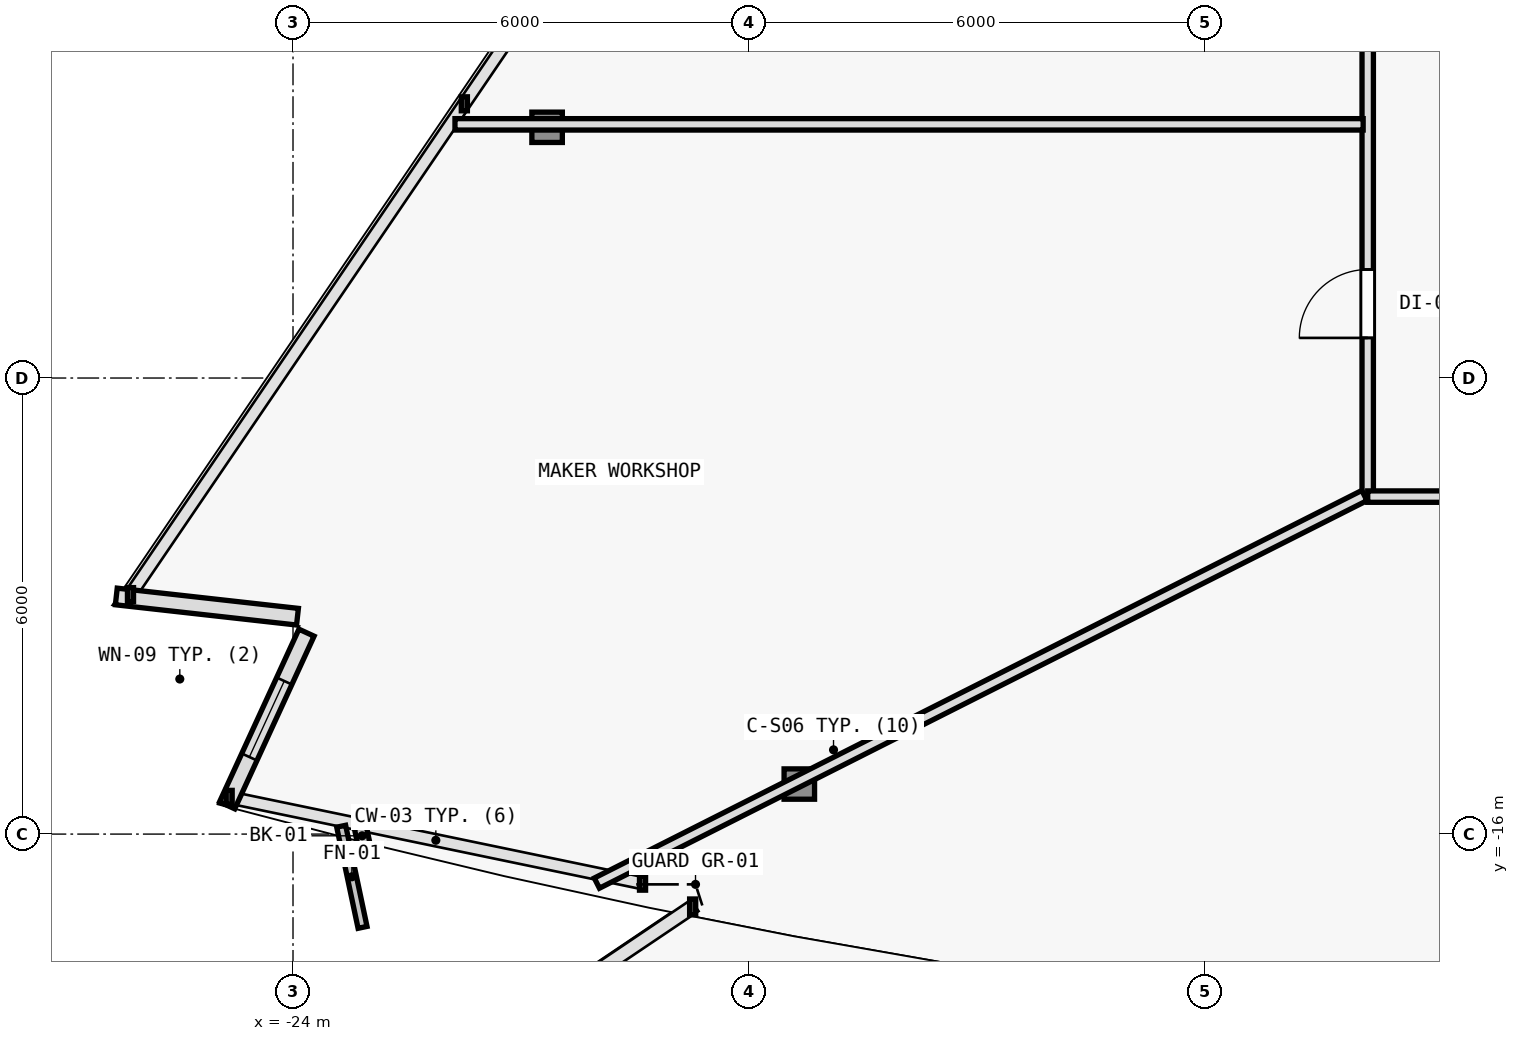
"""IFC4 building model, lengths in metres.
Left out: names, types, materials, properties, quantities, classifications, styles, units other than length and angle.
Written with IfcOpenShell. Run it as: python <this file> out.ifc"""

import sys

from ifc_helpers import new_model, si_unit, direction, frame, frame_2d, origin, origin_2d, place, context, subcontext, project, spatial, rectangle, i_section, extrude, element, fill, save


model = new_model("IFC4")
c1 = context("Model", 3, precision=1e-05, world=origin(), true_north=direction((0.0, 1.0)))
c2 = subcontext(c1, "Body", "Model", "MODEL_VIEW")
j1 = project(units=[si_unit("LENGTHUNIT", "METRE"), si_unit("PLANEANGLEUNIT", "RADIAN")], contexts=[c1])
p1 = place(None, origin())
s1 = spatial("IfcSite", under=j1, at=p1, CompositionType="ELEMENT")
p2 = place(p1, origin())
s2 = spatial("IfcBuilding", under=s1, at=p2, CompositionType="ELEMENT")
p3 = place(p2, frame((0.0, 0.0, 178.2)))
s3 = spatial("IfcBuildingStorey", under=s2, at=p3, CompositionType="ELEMENT", Elevation=178.2)
p4 = place(p3, frame((-17.338, -15.342, 0.006), z_axis=(0.020596292833, 0.033511459955, 0.999226087917), x_axis=(-0.851954850327, 0.523615252838, 0.0)))
e1 = element("IfcColumn", 1, at=p4, inside=s3, PredefinedType="COLUMN", context=c2, shape_type="SweptSolid", body=[
    extrude(i_section(OverallWidth=0.401, OverallDepth=0.399, WebThickness=0.016, FlangeThickness=0.025, FilletRadius=0.015, at=origin_2d()), origin(), (0.0, 0.0, 1.0), 3.592),
])
p5 = place(p3, frame((-20.657, -6.701, 0.006), z_axis=(0.025224163578, 0.021620711639, 0.999447990843), x_axis=(-0.650791373456, 0.759256602365, 0.0)))
e2 = element("IfcColumn", 2, at=p5, inside=s3, PredefinedType="COLUMN", context=c2, shape_type="SweptSolid", body=[
    extrude(i_section(OverallWidth=0.401, OverallDepth=0.399, WebThickness=0.016, FlangeThickness=0.025, FilletRadius=0.015, at=origin_2d()), origin(), (0.0, 0.0, 1.0), 3.591),
])
p6 = place(p3, frame((-23.941, -13.14, 0.0), z_axis=(0.0, 0.0, 1.0), x_axis=(-0.993825249999, 0.110956624245, 0.0)))
e3 = element("IfcWall", 3, at=p6, inside=s3, PredefinedType="SOLIDWALL", context=c2, shape_type="SweptSolid", body=[
    extrude(rectangle(XDim=2.398, YDim=0.22, at=frame_2d((1.199, 0.0))), origin(), (0.0, 0.0, 1.0), 3.35),
])
p7 = place(p3, frame((-24.866, -15.622, 0.0), z_axis=(0.0, 0.0, 1.0), x_axis=(0.417478378529, 0.908686856657, 0.0)))
e4 = element("IfcWall", 4, at=p7, inside=s3, PredefinedType="SOLIDWALL", context=c2, shape_type="SweptSolid", body=[
    extrude(rectangle(XDim=2.5, YDim=0.22, at=frame_2d((1.25, 0.0))), origin(), (0.0, 0.0, 1.0), 3.35),
])
p8 = place(p7, frame((0.7, 0.0, 0.62)))
e5 = element("IfcOpeningElement", 5, at=p8, cuts=e4, PredefinedType="OPENING", context=c2, shape_type="SweptSolid", body=[
    extrude(rectangle(XDim=1.1, YDim=1.8, at=frame_2d((0.55, 0.9))), frame((0.0, 0.12, 0.0), z_axis=(0.0, -1.0, 0.0), x_axis=(1.0, 0.0, 0.0)), (0.0, 0.0, 1.0), 0.24),
])
p9 = place(p3, frame((-9.86, -11.56, 0.0), z_axis=(0.0, 0.0, 1.0), x_axis=(0.0, 1.0, 0.0)))
e6 = element("IfcWall", 6, at=p9, inside=s3, PredefinedType="PARTITIONING", context=c2, shape_type="SweptSolid", body=[
    extrude(rectangle(XDim=19.986, YDim=0.15, at=frame_2d((9.993, 0.0))), origin(), (0.0, 0.0, 1.0), 2.825),
])
p10 = place(p9, frame((10.942, 0.0, 0.0)))
e7 = element("IfcOpeningElement", 7, at=p10, cuts=e6, PredefinedType="OPENING", context=c2, shape_type="SweptSolid", body=[
    extrude(rectangle(XDim=0.85, YDim=2.1, at=frame_2d((0.425, 1.05))), frame((0.0, 0.085, 0.0), z_axis=(0.0, -1.0, 0.0), x_axis=(1.0, 0.0, 0.0)), (0.0, 0.0, 1.0), 0.17),
])
p11 = place(p9, frame((8.965, 0.0, 0.0)))
e8 = element("IfcOpeningElement", 8, at=p11, cuts=e6, PredefinedType="OPENING", context=c2, shape_type="SweptSolid", body=[
    extrude(rectangle(XDim=0.9, YDim=2.1, at=frame_2d((0.45, 1.05))), frame((0.0, 0.085, 0.0), z_axis=(0.0, -1.0, 0.0), x_axis=(1.0, 0.0, 0.0)), (0.0, 0.0, 1.0), 0.17),
])
p12 = place(p9, frame((6.134, 0.0, 0.0)))
e9 = element("IfcOpeningElement", 9, at=p12, cuts=e6, PredefinedType="OPENING", context=c2, shape_type="SweptSolid", body=[
    extrude(rectangle(XDim=0.9, YDim=2.1, at=frame_2d((0.45, 1.05))), frame((0.0, 0.085, 0.0), z_axis=(0.0, -1.0, 0.0), x_axis=(1.0, 0.0, 0.0)), (0.0, 0.0, 1.0), 0.17),
])
p13 = place(p9, frame((2.088, 0.0, 0.0)))
e10 = element("IfcOpeningElement", 10, at=p13, cuts=e6, PredefinedType="OPENING", context=c2, shape_type="SweptSolid", body=[
    extrude(rectangle(XDim=0.9, YDim=2.1, at=frame_2d((0.45, 1.05))), frame((0.0, 0.085, 0.0), z_axis=(0.0, -1.0, 0.0), x_axis=(1.0, 0.0, 0.0)), (0.0, 0.0, 1.0), 0.17),
])
p14 = place(p9, frame((13.815, 0.0, 0.0)))
e11 = element("IfcOpeningElement", 11, at=p14, cuts=e6, PredefinedType="OPENING", context=c2, shape_type="SweptSolid", body=[
    extrude(rectangle(XDim=0.85, YDim=2.1, at=frame_2d((0.425, 1.05))), frame((0.0, 0.085, 0.0), z_axis=(0.0, -1.0, 0.0), x_axis=(1.0, 0.0, 0.0)), (0.0, 0.0, 1.0), 0.17),
])
p15 = place(p9, frame((12.357, 0.0, 0.0)))
e12 = element("IfcOpeningElement", 12, at=p15, cuts=e6, PredefinedType="OPENING", context=c2, shape_type="SweptSolid", body=[
    extrude(rectangle(XDim=0.85, YDim=2.1, at=frame_2d((0.425, 1.05))), frame((0.0, 0.085, 0.0), z_axis=(0.0, -1.0, 0.0), x_axis=(1.0, 0.0, 0.0)), (0.0, 0.0, 1.0), 0.17),
])
p16 = place(p3, frame((13.18, -11.56, 0.0), z_axis=(0.0, 0.0, 1.0), x_axis=(-1.0, 0.0, 0.0)))
e13 = element("IfcWall", 13, at=p16, inside=s3, PredefinedType="PARTITIONING", context=c2, shape_type="SweptSolid", body=[
    extrude(rectangle(XDim=23.04, YDim=0.15, at=frame_2d((11.52, 0.0))), origin(), (0.0, 0.0, 1.0), 2.825),
])
p17 = place(p16, frame((14.671, 0.0, 0.0)))
e14 = element("IfcOpeningElement", 14, at=p17, cuts=e13, PredefinedType="OPENING", context=c2, shape_type="SweptSolid", body=[
    extrude(rectangle(XDim=0.9, YDim=2.1, at=frame_2d((0.45, 1.05))), frame((0.0, 0.085, 0.0), z_axis=(0.0, -1.0, 0.0), x_axis=(1.0, 0.0, 0.0)), (0.0, 0.0, 1.0), 0.17),
])
p18 = place(p16, frame((5.805, 0.0, 0.0)))
e15 = element("IfcOpeningElement", 15, at=p18, cuts=e13, PredefinedType="OPENING", context=c2, shape_type="SweptSolid", body=[
    extrude(rectangle(XDim=0.9, YDim=2.1, at=frame_2d((0.45, 1.05))), frame((0.0, 0.085, 0.0), z_axis=(0.0, -1.0, 0.0), x_axis=(1.0, 0.0, 0.0)), (0.0, 0.0, 1.0), 0.17),
])
p19 = place(p16, frame((3.328, 0.0, 0.0)))
e16 = element("IfcOpeningElement", 16, at=p19, cuts=e13, PredefinedType="OPENING", context=c2, shape_type="SweptSolid", body=[
    extrude(rectangle(XDim=0.9, YDim=2.1, at=frame_2d((0.45, 1.05))), frame((0.0, 0.085, 0.0), z_axis=(0.0, -1.0, 0.0), x_axis=(1.0, 0.0, 0.0)), (0.0, 0.0, 1.0), 0.17),
])
p20 = place(p16, frame((0.854, 0.0, 0.0)))
e17 = element("IfcOpeningElement", 17, at=p20, cuts=e13, PredefinedType="OPENING", context=c2, shape_type="SweptSolid", body=[
    extrude(rectangle(XDim=0.9, YDim=2.1, at=frame_2d((0.45, 1.05))), frame((0.0, 0.085, 0.0), z_axis=(0.0, -1.0, 0.0), x_axis=(1.0, 0.0, 0.0)), (0.0, 0.0, 1.0), 0.17),
])
p21 = place(p3, frame((-9.903, -11.546, 0.0), z_axis=(0.0, 0.0, 1.0), x_axis=(-0.892654982615, -0.450740592817, 0.0)))
e18 = element("IfcWall", 18, at=p21, inside=s3, PredefinedType="PARTITIONING", context=c2, shape_type="SweptSolid", body=[
    extrude(rectangle(XDim=11.313, YDim=0.15, at=frame_2d((5.657, 0.0))), origin(), (0.0, 0.0, 1.0), 2.775),
])
p22 = place(p3, frame((-9.92, -6.663, 0.0), z_axis=(0.0, 0.0, 1.0), x_axis=(-1.0, 0.0, 0.0)))
e19 = element("IfcWall", 19, at=p22, inside=s3, PredefinedType="PARTITIONING", context=c2, shape_type="SweptSolid", body=[
    extrude(rectangle(XDim=11.949, YDim=0.15, at=frame_2d((5.975, 0.0))), origin(), (0.0, 0.0, 1.0), 2.825),
])
p23 = place(p8, origin())
e20 = element("IfcWindow", 20, at=p23, inside=s3, PartitioningType="SINGLE_PANEL", PredefinedType="WINDOW", context=c2, shape_type="SweptSolid", body=[
    extrude(rectangle(XDim=1.1, YDim=1.8, at=frame_2d((0.55, 0.9))), frame((0.0, 0.03, 0.0), z_axis=(0.0, -1.0, 0.0), x_axis=(1.0, 0.0, 0.0)), (0.0, 0.0, 1.0), 0.06),
])
fill(e5, e20)
p24 = place(p13, origin())
e21 = element("IfcDoor", 21, at=p24, inside=s3, OperationType="SINGLE_SWING_LEFT", PredefinedType="DOOR", context=c2, shape_type="SweptSolid", body=[
    extrude(rectangle(XDim=0.9, YDim=2.1, at=frame_2d((0.45, 1.05))), frame((0.0, 0.025, 0.0), z_axis=(0.0, -1.0, 0.0), x_axis=(1.0, 0.0, 0.0)), (0.0, 0.0, 1.0), 0.05),
])
fill(e10, e21)
save(model, sys.argv[1])
